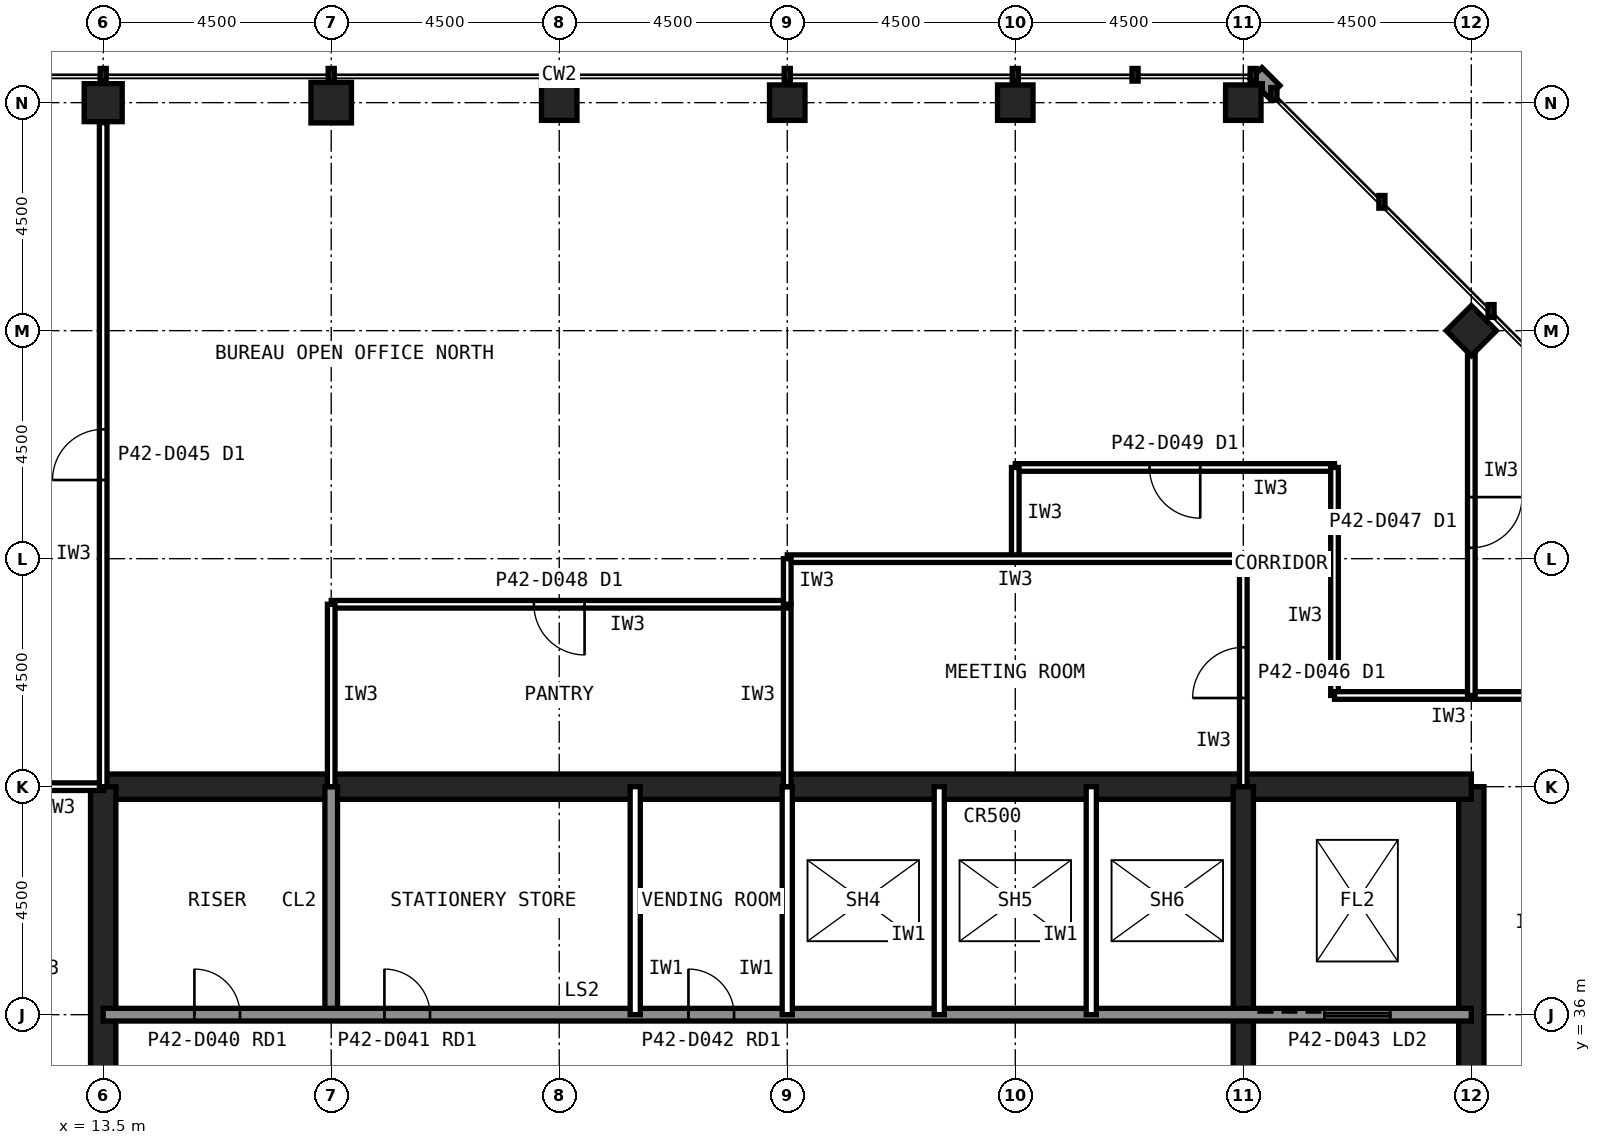
"""IFC4 building model, lengths in metres.
Left out: names, types, materials, properties, quantities, classifications, styles, units other than length and angle.
Written with IfcOpenShell. Run it as: python <this file> out.ifc"""

import sys

from ifc_helpers import new_model, si_unit, direction, frame, frame_2d, origin, origin_2d, place, context, subcontext, project, spatial, rectangle, hollow_rectangle, extrude, element, fill, save


model = new_model("IFC4")
c1 = context("Model", 3, precision=1e-05, world=origin(), true_north=direction((0.0, 1.0)))
c2 = subcontext(c1, "Body", "Model", "MODEL_VIEW")
j1 = project(units=[si_unit("LENGTHUNIT", "METRE"), si_unit("PLANEANGLEUNIT", "RADIAN")], contexts=[c1])
p1 = place(None, origin())
s1 = spatial("IfcSite", under=j1, at=p1, CompositionType="ELEMENT")
p2 = place(p1, origin())
s2 = spatial("IfcBuilding", under=s1, at=p2, CompositionType="ELEMENT")
p3 = place(p2, frame((0.0, 0.0, 175.6)))
s3 = spatial("IfcBuildingStorey", under=s2, at=p3, CompositionType="ELEMENT", Elevation=175.6)
for number, where, z_axis, x_axis in (
    (1, (36.0, 54.0, 0.0), (0.0, 0.0, 1.0), (1.0, 0.0, 0.0)),
    (2, (31.5, 54.0, 0.0), (0.0, 0.0, 1.0), (1.0, 0.0, 0.0)),
    (3, (27.0, 54.0, 0.0), (0.0, 0.0, 1.0), (1.0, 0.0, 0.0)),
    (4, (22.5, 54.0, 0.0), (0.0, 0.0, 1.0), (1.0, 0.0, 0.0)),
):
    element("IfcColumn", number, at=place(p3, frame(where, z_axis=z_axis, x_axis=x_axis)), inside=s3, PredefinedType="COLUMN", context=c2, shape_type="SweptSolid", body=[
        extrude(hollow_rectangle(XDim=0.7, YDim=0.7, WallThickness=0.036, at=origin_2d()), origin(), (0.0, 0.0, 1.0), 4.0),
    ])
p4 = place(p3, frame((18.0, 54.0, 0.0), z_axis=(0.0, 0.0, 1.0), x_axis=(1.0, 0.0, 0.0)))
e5 = element("IfcColumn", 5, at=p4, inside=s3, PredefinedType="COLUMN", context=c2, shape_type="SweptSolid", body=[
    extrude(hollow_rectangle(XDim=0.8, YDim=0.8, WallThickness=0.045, at=origin_2d()), origin(), (0.0, 0.0, 1.0), 4.0),
])
p5 = place(p3, frame((13.5, 54.0, 0.0), z_axis=(0.0, 0.0, 1.0), x_axis=(1.0, 0.0, 0.0)))
e6 = element("IfcColumn", 6, at=p5, inside=s3, PredefinedType="COLUMN", context=c2, shape_type="SweptSolid", body=[
    extrude(hollow_rectangle(XDim=0.75, YDim=0.75, WallThickness=0.04, at=origin_2d()), origin(), (0.0, 0.0, 1.0), 4.0),
])
p6 = place(p3, frame((40.5, 49.5, 0.0), z_axis=(0.0, 0.0, 1.0), x_axis=(0.707106781187, 0.707106781187, 0.0)))
e7 = element("IfcColumn", 7, at=p6, inside=s3, PredefinedType="COLUMN", context=c2, shape_type="SweptSolid", body=[
    extrude(hollow_rectangle(XDim=0.7, YDim=0.7, WallThickness=0.036, at=origin_2d()), origin(), (0.0, 0.0, 1.0), 4.0),
])
p7 = place(p3, frame((40.5, 13.5, 0.0), z_axis=(0.0, 0.0, 1.0), x_axis=(0.0, 1.0, 0.0)))
e8 = element("IfcWall", 8, at=p7, inside=s3, PredefinedType="SHEAR", context=c2, shape_type="SweptSolid", body=[
    extrude(rectangle(XDim=27.0, YDim=0.5, at=frame_2d((13.5, 0.0))), origin(), (0.0, 0.0, 1.0), 4.0),
])
p8 = place(p7, frame((5.85, 0.0, 0.0)))
e9 = element("IfcOpeningElement", 9, at=p8, cuts=e8, PredefinedType="OPENING", context=c2, shape_type="SweptSolid", body=[
    extrude(rectangle(XDim=1.8, YDim=2.1, at=frame_2d((0.9, 1.05))), frame((0.0, 0.26, 0.0), z_axis=(0.0, -1.0, 0.0), x_axis=(1.0, 0.0, 0.0)), (0.0, 0.0, 1.0), 0.52),
])
p9 = place(p7, frame((19.65, 0.0, 0.0)))
e10 = element("IfcOpeningElement", 10, at=p9, cuts=e8, PredefinedType="OPENING", context=c2, shape_type="SweptSolid", body=[
    extrude(rectangle(XDim=1.2, YDim=2.1, at=frame_2d((0.6, 1.05))), frame((0.0, 0.26, 0.0), z_axis=(0.0, -1.0, 0.0), x_axis=(1.0, 0.0, 0.0)), (0.0, 0.0, 1.0), 0.52),
])
p10 = place(p3, frame((40.5, 40.5, 0.0), z_axis=(0.0, 0.0, 1.0), x_axis=(-1.0, 0.0, 0.0)))
e11 = element("IfcWall", 11, at=p10, inside=s3, PredefinedType="SHEAR", context=c2, shape_type="SweptSolid", body=[
    extrude(rectangle(XDim=27.0, YDim=0.5, at=frame_2d((13.5, 0.0))), origin(), (0.0, 0.0, 1.0), 4.0),
])
p11 = place(p3, frame((13.5, 40.5, 0.0), z_axis=(0.0, 0.0, 1.0), x_axis=(0.0, -1.0, 0.0)))
e12 = element("IfcWall", 12, at=p11, inside=s3, PredefinedType="SHEAR", context=c2, shape_type="SweptSolid", body=[
    extrude(rectangle(XDim=27.0, YDim=0.5, at=frame_2d((13.5, 0.0))), origin(), (0.0, 0.0, 1.0), 4.0),
])
p12 = place(p11, frame((19.65, 0.0, 0.0)))
e13 = element("IfcOpeningElement", 13, at=p12, cuts=e12, PredefinedType="OPENING", context=c2, shape_type="SweptSolid", body=[
    extrude(rectangle(XDim=1.2, YDim=2.1, at=frame_2d((0.6, 1.05))), frame((0.0, 0.26, 0.0), z_axis=(0.0, -1.0, 0.0), x_axis=(1.0, 0.0, 0.0)), (0.0, 0.0, 1.0), 0.52),
])
p13 = place(p11, frame((5.85, 0.0, 0.0)))
e14 = element("IfcOpeningElement", 14, at=p13, cuts=e12, PredefinedType="OPENING", context=c2, shape_type="SweptSolid", body=[
    extrude(rectangle(XDim=1.8, YDim=2.1, at=frame_2d((0.9, 1.05))), frame((0.0, 0.26, 0.0), z_axis=(0.0, -1.0, 0.0), x_axis=(1.0, 0.0, 0.0)), (0.0, 0.0, 1.0), 0.52),
])
p14 = place(p3, frame((18.0, 36.0, 0.0), z_axis=(0.0, 0.0, 1.0), x_axis=(0.0, 1.0, 0.0)))
e15 = element("IfcWall", 15, at=p14, inside=s3, PredefinedType="SOLIDWALL", context=c2, shape_type="SweptSolid", body=[
    extrude(rectangle(XDim=4.5, YDim=0.25, at=frame_2d((2.25, 0.0))), origin(), (0.0, 0.0, 1.0), 3.84),
])
p15 = place(p3, frame((36.0, 22.5, 0.0), z_axis=(0.0, 0.0, 1.0), x_axis=(0.0, 1.0, 0.0)))
e16 = element("IfcWall", 16, at=p15, inside=s3, PredefinedType="SHEAR", context=c2, shape_type="SweptSolid", body=[
    extrude(rectangle(XDim=18.0, YDim=0.4, at=frame_2d((9.0, 0.0))), origin(), (0.0, 0.0, 1.0), 4.0),
])
p16 = place(p3, frame((13.5, 36.0, 0.0), z_axis=(0.0, 0.0, 1.0), x_axis=(1.0, 0.0, 0.0)))
e17 = element("IfcWall", 17, at=p16, inside=s3, PredefinedType="SOLIDWALL", context=c2, shape_type="SweptSolid", body=[
    extrude(rectangle(XDim=27.0, YDim=0.25, at=frame_2d((13.5, 0.0))), origin(), (0.0, 0.0, 1.0), 3.84),
])
p17 = place(p16, frame((1.8, 0.0, 0.0)))
e18 = element("IfcOpeningElement", 18, at=p17, cuts=e17, PredefinedType="OPENING", context=c2, shape_type="SweptSolid", body=[
    extrude(rectangle(XDim=0.9, YDim=2.1, at=frame_2d((0.45, 1.05))), frame((0.0, 0.135, 0.0), z_axis=(0.0, -1.0, 0.0), x_axis=(1.0, 0.0, 0.0)), (0.0, 0.0, 1.0), 0.27),
])
p18 = place(p16, frame((5.55, 0.0, 0.0)))
e19 = element("IfcOpeningElement", 19, at=p18, cuts=e17, PredefinedType="OPENING", context=c2, shape_type="SweptSolid", body=[
    extrude(rectangle(XDim=0.9, YDim=2.1, at=frame_2d((0.45, 1.05))), frame((0.0, 0.135, 0.0), z_axis=(0.0, -1.0, 0.0), x_axis=(1.0, 0.0, 0.0)), (0.0, 0.0, 1.0), 0.27),
])
p19 = place(p16, frame((8.55, 0.0, 0.0)))
e20 = element("IfcOpeningElement", 20, at=p19, cuts=e17, PredefinedType="OPENING", context=c2, shape_type="SweptSolid", body=[
    extrude(rectangle(XDim=0.9, YDim=2.1, at=frame_2d((0.45, 1.05))), frame((0.0, 0.135, 0.0), z_axis=(0.0, -1.0, 0.0), x_axis=(1.0, 0.0, 0.0)), (0.0, 0.0, 1.0), 0.27),
])
p20 = place(p16, frame((11.55, 0.0, 0.0)))
e21 = element("IfcOpeningElement", 21, at=p20, cuts=e17, PredefinedType="OPENING", context=c2, shape_type="SweptSolid", body=[
    extrude(rectangle(XDim=0.9, YDim=2.1, at=frame_2d((0.45, 1.05))), frame((0.0, 0.135, 0.0), z_axis=(0.0, -1.0, 0.0), x_axis=(1.0, 0.0, 0.0)), (0.0, 0.0, 1.0), 0.27),
])
p21 = place(p16, frame((24.1, 0.0, 0.0)))
e22 = element("IfcOpeningElement", 22, at=p21, cuts=e17, PredefinedType="OPENING", context=c2, shape_type="SweptSolid", body=[
    extrude(rectangle(XDim=1.3, YDim=2.2, at=frame_2d((0.65, 1.1))), frame((0.0, 0.135, 0.0), z_axis=(0.0, -1.0, 0.0), x_axis=(1.0, 0.0, 0.0)), (0.0, 0.0, 1.0), 0.27),
])
for number, where, z_axis, x_axis in (
    (23, (21.0, 36.0, 0.0), (0.0, 0.0, 1.0), (0.0, 1.0, 0.0)),
    (24, (24.0, 36.0, 0.0), (0.0, 0.0, 1.0), (0.0, 1.0, 0.0)),
    (25, (27.0, 36.0, 0.0), (0.0, 0.0, 1.0), (0.0, 1.0, 0.0)),
    (26, (30.0, 36.0, 0.0), (0.0, 0.0, 1.0), (0.0, 1.0, 0.0)),
    (27, (33.0, 36.0, 0.0), (0.0, 0.0, 1.0), (0.0, 1.0, 0.0)),
):
    element("IfcWall", number, at=place(p3, frame(where, z_axis=z_axis, x_axis=x_axis)), inside=s3, PredefinedType="PARTITIONING", context=c2, shape_type="SweptSolid", body=[
        extrude(rectangle(XDim=4.5, YDim=0.2, at=frame_2d((2.25, 0.0))), origin(), (0.0, 0.0, 1.0), 3.84),
    ])
for number, where, z_axis, x_axis in (
    (28, (13.51, 40.5, 0.0), (0.0, 0.0, 1.0), (-1.0, 0.0, 0.0)),
    (29, (42.3, 40.5, 0.0), (0.0, 0.0, 1.0), (-1.0, 0.0, 0.0)),
):
    element("IfcWall", number, at=place(p3, frame(where, z_axis=z_axis, x_axis=x_axis)), inside=s3, PredefinedType="PARTITIONING", context=c2, shape_type="SweptSolid", body=[
        extrude(rectangle(XDim=1.81, YDim=0.15, at=frame_2d((0.905, 0.0))), origin(), (0.0, 0.0, 1.0), 2.989),
    ])
p22 = place(p3, frame((27.0, 40.5, 0.0), z_axis=(0.0, 0.0, 1.0), x_axis=(0.0, 1.0, 0.0)))
e30 = element("IfcWall", 30, at=p22, inside=s3, PredefinedType="PARTITIONING", context=c2, shape_type="SweptSolid", body=[
    extrude(rectangle(XDim=3.6, YDim=0.15, at=frame_2d((1.8, 0.0))), origin(), (0.0, 0.0, 1.0), 2.989),
])
p23 = place(p3, frame((27.0, 44.1, 0.0), z_axis=(0.0, 0.0, 1.0), x_axis=(-1.0, 0.0, 0.0)))
e31 = element("IfcWall", 31, at=p23, inside=s3, PredefinedType="PARTITIONING", context=c2, shape_type="SweptSolid", body=[
    extrude(rectangle(XDim=9.0, YDim=0.15, at=frame_2d((4.5, 0.0))), origin(), (0.0, 0.0, 1.0), 3.84),
])
p24 = place(p23, frame((4.0, 0.0, 0.0)))
e32 = element("IfcOpeningElement", 32, at=p24, cuts=e31, PredefinedType="OPENING", context=c2, shape_type="SweptSolid", body=[
    extrude(rectangle(XDim=1.0, YDim=2.1, at=frame_2d((0.5, 1.05))), frame((0.0, 0.085, 0.0), z_axis=(0.0, -1.0, 0.0), x_axis=(1.0, 0.0, 0.0)), (0.0, 0.0, 1.0), 0.17),
])
p25 = place(p3, frame((18.0, 44.1, 0.0), z_axis=(0.0, 0.0, 1.0), x_axis=(0.0, -1.0, 0.0)))
e33 = element("IfcWall", 33, at=p25, inside=s3, PredefinedType="PARTITIONING", context=c2, shape_type="SweptSolid", body=[
    extrude(rectangle(XDim=3.6, YDim=0.15, at=frame_2d((1.8, 0.0))), origin(), (0.0, 0.0, 1.0), 2.989),
])
p26 = place(p3, frame((36.0, 40.5, 0.0), z_axis=(0.0, 0.0, 1.0), x_axis=(0.0, 1.0, 0.0)))
e34 = element("IfcWall", 34, at=p26, inside=s3, PredefinedType="PARTITIONING", context=c2, shape_type="SweptSolid", body=[
    extrude(rectangle(XDim=4.5, YDim=0.15, at=frame_2d((2.25, 0.0))), origin(), (0.0, 0.0, 1.0), 2.989),
])
p27 = place(p26, frame((1.75, 0.0, 0.0)))
e35 = element("IfcOpeningElement", 35, at=p27, cuts=e34, PredefinedType="OPENING", context=c2, shape_type="SweptSolid", body=[
    extrude(rectangle(XDim=1.0, YDim=2.1, at=frame_2d((0.5, 1.05))), frame((0.0, 0.085, 0.0), z_axis=(0.0, -1.0, 0.0), x_axis=(1.0, 0.0, 0.0)), (0.0, 0.0, 1.0), 0.17),
])
p28 = place(p3, frame((36.0, 45.0, 0.0), z_axis=(0.0, 0.0, 1.0), x_axis=(-1.0, 0.0, 0.0)))
e36 = element("IfcWall", 36, at=p28, inside=s3, PredefinedType="PARTITIONING", context=c2, shape_type="SweptSolid", body=[
    extrude(rectangle(XDim=9.0, YDim=0.15, at=frame_2d((4.5, 0.0))), origin(), (0.0, 0.0, 1.0), 3.84),
])
p29 = place(p3, frame((27.0, 45.0, 0.0), z_axis=(0.0, 0.0, 1.0), x_axis=(0.0, -1.0, 0.0)))
e37 = element("IfcWall", 37, at=p29, inside=s3, PredefinedType="PARTITIONING", context=c2, shape_type="SweptSolid", body=[
    extrude(rectangle(XDim=0.9, YDim=0.15, at=frame_2d((0.45, 0.0))), origin(), (0.0, 0.0, 1.0), 2.989),
])
p30 = place(p3, frame((13.5, 40.5, 0.0), z_axis=(0.0, 0.0, 1.0), x_axis=(0.0, 1.0, 0.0)))
e38 = element("IfcWall", 38, at=p30, inside=s3, PredefinedType="PARTITIONING", context=c2, shape_type="SweptSolid", body=[
    extrude(rectangle(XDim=13.105, YDim=0.15, at=frame_2d((6.552, 0.0))), origin(), (0.0, 0.0, 1.0), 2.989),
])
p31 = place(p30, frame((6.052, 0.0, 0.0)))
e39 = element("IfcOpeningElement", 39, at=p31, cuts=e38, PredefinedType="OPENING", context=c2, shape_type="SweptSolid", body=[
    extrude(rectangle(XDim=1.0, YDim=2.1, at=frame_2d((0.5, 1.05))), frame((0.0, 0.085, 0.0), z_axis=(0.0, -1.0, 0.0), x_axis=(1.0, 0.0, 0.0)), (0.0, 0.0, 1.0), 0.17),
])
p32 = place(p3, frame((40.5, 49.13, 0.0), z_axis=(0.0, 0.0, 1.0), x_axis=(0.0, -1.0, 0.0)))
e40 = element("IfcWall", 40, at=p32, inside=s3, PredefinedType="PARTITIONING", context=c2, shape_type="SweptSolid", body=[
    extrude(rectangle(XDim=8.63, YDim=0.15, at=frame_2d((4.315, 0.0))), origin(), (0.0, 0.0, 1.0), 2.989),
])
p33 = place(p32, frame((3.815, 0.0, 0.0)))
e41 = element("IfcOpeningElement", 41, at=p33, cuts=e40, PredefinedType="OPENING", context=c2, shape_type="SweptSolid", body=[
    extrude(rectangle(XDim=1.0, YDim=2.1, at=frame_2d((0.5, 1.05))), frame((0.0, 0.085, 0.0), z_axis=(0.0, -1.0, 0.0), x_axis=(1.0, 0.0, 0.0)), (0.0, 0.0, 1.0), 0.17),
])
p34 = place(p17, origin())
e42 = element("IfcDoor", 42, at=p34, inside=s3, OperationType="SINGLE_SWING_LEFT", PredefinedType="DOOR", context=c2, shape_type="SweptSolid", body=[
    extrude(rectangle(XDim=0.9, YDim=2.1, at=frame_2d((0.45, 1.05))), frame((0.0, 0.025, 0.0), z_axis=(0.0, -1.0, 0.0), x_axis=(1.0, 0.0, 0.0)), (0.0, 0.0, 1.0), 0.05),
])
fill(e18, e42)
p35 = place(p18, origin())
e43 = element("IfcDoor", 43, at=p35, inside=s3, OperationType="SINGLE_SWING_LEFT", PredefinedType="DOOR", context=c2, shape_type="SweptSolid", body=[
    extrude(rectangle(XDim=0.9, YDim=2.1, at=frame_2d((0.45, 1.05))), frame((0.0, 0.025, 0.0), z_axis=(0.0, -1.0, 0.0), x_axis=(1.0, 0.0, 0.0)), (0.0, 0.0, 1.0), 0.05),
])
fill(e19, e43)
p36 = place(p19, origin())
e44 = element("IfcDoor", 44, at=p36, inside=s3, OperationType="SINGLE_SWING_LEFT", PredefinedType="DOOR", context=c2, shape_type="SweptSolid", body=[
    extrude(rectangle(XDim=0.9, YDim=2.1, at=frame_2d((0.45, 1.05))), frame((0.0, 0.025, 0.0), z_axis=(0.0, -1.0, 0.0), x_axis=(1.0, 0.0, 0.0)), (0.0, 0.0, 1.0), 0.05),
])
fill(e20, e44)
p37 = place(p20, origin())
e45 = element("IfcDoor", 45, at=p37, inside=s3, OperationType="SINGLE_SWING_LEFT", PredefinedType="DOOR", context=c2, shape_type="SweptSolid", body=[
    extrude(rectangle(XDim=0.9, YDim=2.1, at=frame_2d((0.45, 1.05))), frame((0.0, 0.025, 0.0), z_axis=(0.0, -1.0, 0.0), x_axis=(1.0, 0.0, 0.0)), (0.0, 0.0, 1.0), 0.05),
])
fill(e21, e45)
p38 = place(p21, origin())
e46 = element("IfcDoor", 46, at=p38, inside=s3, OperationType="SLIDING_TO_LEFT", PredefinedType="DOOR", context=c2, shape_type="SweptSolid", body=[
    extrude(rectangle(XDim=1.3, YDim=2.2, at=frame_2d((0.65, 1.1))), frame((0.0, 0.025, 0.0), z_axis=(0.0, -1.0, 0.0), x_axis=(1.0, 0.0, 0.0)), (0.0, 0.0, 1.0), 0.05),
])
fill(e22, e46)
p39 = place(p24, origin())
e47 = element("IfcDoor", 47, at=p39, inside=s3, OperationType="SINGLE_SWING_LEFT", PredefinedType="DOOR", context=c2, shape_type="SweptSolid", body=[
    extrude(rectangle(XDim=1.0, YDim=2.1, at=frame_2d((0.5, 1.05))), frame((0.0, 0.025, 0.0), z_axis=(0.0, -1.0, 0.0), x_axis=(1.0, 0.0, 0.0)), (0.0, 0.0, 1.0), 0.05),
])
fill(e32, e47)
p40 = place(p27, origin())
e48 = element("IfcDoor", 48, at=p40, inside=s3, OperationType="SINGLE_SWING_LEFT", PredefinedType="DOOR", context=c2, shape_type="SweptSolid", body=[
    extrude(rectangle(XDim=1.0, YDim=2.1, at=frame_2d((0.5, 1.05))), frame((0.0, 0.025, 0.0), z_axis=(0.0, -1.0, 0.0), x_axis=(1.0, 0.0, 0.0)), (0.0, 0.0, 1.0), 0.05),
])
fill(e35, e48)
p41 = place(p31, origin())
e49 = element("IfcDoor", 49, at=p41, inside=s3, OperationType="SINGLE_SWING_LEFT", PredefinedType="DOOR", context=c2, shape_type="SweptSolid", body=[
    extrude(rectangle(XDim=1.0, YDim=2.1, at=frame_2d((0.5, 1.05))), frame((0.0, 0.025, 0.0), z_axis=(0.0, -1.0, 0.0), x_axis=(1.0, 0.0, 0.0)), (0.0, 0.0, 1.0), 0.05),
])
fill(e39, e49)
p42 = place(p33, origin())
e50 = element("IfcDoor", 50, at=p42, inside=s3, OperationType="SINGLE_SWING_LEFT", PredefinedType="DOOR", context=c2, shape_type="SweptSolid", body=[
    extrude(rectangle(XDim=1.0, YDim=2.1, at=frame_2d((0.5, 1.05))), frame((0.0, 0.025, 0.0), z_axis=(0.0, -1.0, 0.0), x_axis=(1.0, 0.0, 0.0)), (0.0, 0.0, 1.0), 0.05),
])
fill(e41, e50)
save(model, sys.argv[1])
